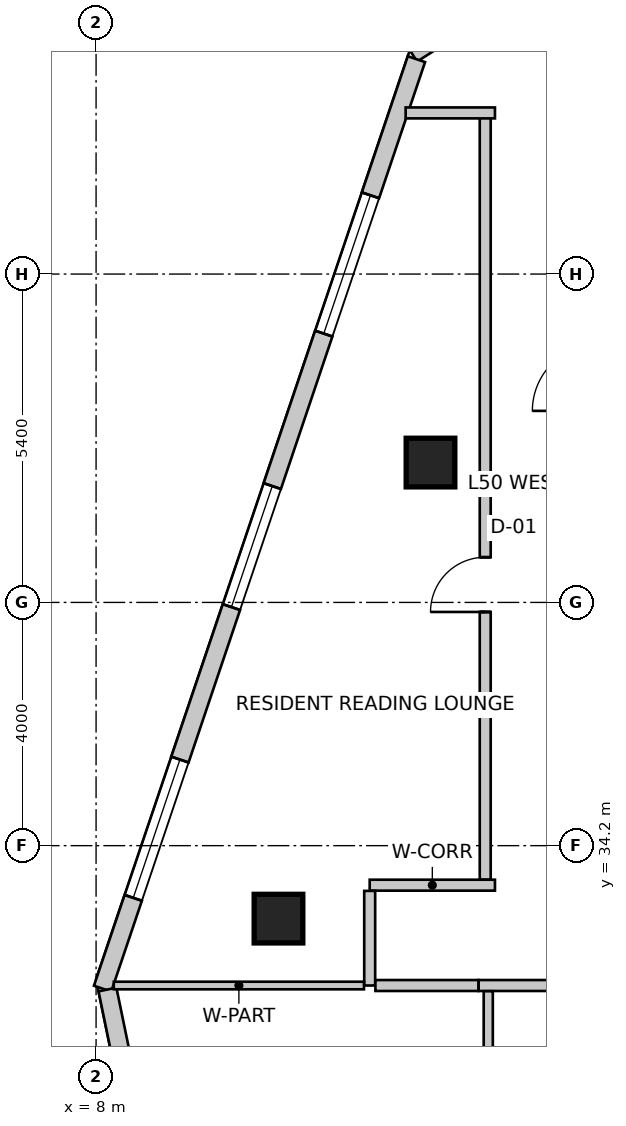
"""IFC4 building model, lengths in metres.
Left out: names, types, materials, properties, quantities, classifications, styles, units other than length and angle.
Written with IfcOpenShell. Run it as: python <this file> out.ifc"""

import sys

from ifc_helpers import new_model, si_unit, direction, frame, frame_2d, origin, origin_2d, place, context, subcontext, project, spatial, rectangle, extrude, source, transform, mapped, element, fill, save


model = new_model("IFC4")
c1 = context("Model", 3, precision=1e-05, world=origin(), true_north=direction((0.0, 1.0)))
c2 = subcontext(c1, "Body", "Model", "MODEL_VIEW")
j1 = project(units=[si_unit("LENGTHUNIT", "METRE"), si_unit("PLANEANGLEUNIT", "RADIAN")], contexts=[c1])
p1 = place(None, origin())
s1 = spatial("IfcSite", under=j1, at=p1, CompositionType="ELEMENT")
p2 = place(p1, origin())
s2 = spatial("IfcBuilding", under=s1, at=p2, CompositionType="ELEMENT")
p3 = place(p2, frame((0.0, 0.0, 200.9)))
s3 = spatial("IfcBuildingStorey", under=s2, at=p3, CompositionType="ELEMENT", Elevation=200.9)
m1 = source(origin(), c2, "Body", "SweptSolid", [
    extrude(rectangle(XDim=0.8, YDim=0.8, at=origin_2d()), origin(), (0.0, 0.0, 1.0), 3.5),
])
for number, where, z_axis, x_axis in (
    (1, (11.0, 33.0, 0.0), (0.0, 0.0, 1.0), (1.0, 0.0, 0.0)),
    (2, (13.5, 40.5, 0.0), (0.0, 0.0, 1.0), (1.0, 0.0, 0.0)),
):
    element("IfcColumn", number, at=place(p3, frame(where, z_axis=z_axis, x_axis=x_axis)), inside=s3, PredefinedType="COLUMN", context=c2, shape_type="MappedRepresentation", body=[
        mapped(m1, transform((0.0, 0.0, 0.0), scale=1.0)),
    ])
p4 = place(p3, frame((21.875, 52.742, 0.0), z_axis=(0.0, 0.0, 1.0), x_axis=(-0.843666375448, -0.536867811419, 0.0)))
e3 = element("IfcWall", 3, at=p4, inside=s3, PredefinedType="SOLIDWALL", context=c2, shape_type="SweptSolid", body=[
    extrude(rectangle(XDim=10.284, YDim=0.3, at=frame_2d((5.142, 0.0))), origin(), (0.0, 0.0, 1.0), 3.25),
])
m2 = source(origin(), c2, "Body", "SweptSolid", [
    extrude(rectangle(XDim=2.1, YDim=2.0, at=frame_2d((1.05, 1.0))), frame((0.0, 0.16, 0.0), z_axis=(0.0, -1.0, 0.0), x_axis=(1.0, 0.0, 0.0)), (0.0, 0.0, 1.0), 0.32),
])
p5 = place(p4, frame((3.457, 0.0, 0.85)))
e4 = element("IfcOpeningElement", 4, at=p5, cuts=e3, PredefinedType="OPENING", context=c2, shape_type="MappedRepresentation", body=[
    mapped(m2, transform((0.0, 0.0, 0.0), scale=1.0)),
])
p6 = place(p3, frame((13.269, 47.134, 0.0), z_axis=(0.0, 0.0, 1.0), x_axis=(-0.319920776449, -0.947444297464, 0.0)))
e5 = element("IfcWall", 5, at=p6, inside=s3, PredefinedType="SOLIDWALL", context=c2, shape_type="SweptSolid", body=[
    extrude(rectangle(XDim=16.133, YDim=0.3, at=frame_2d((8.067, 0.0))), origin(), (0.0, 0.0, 1.0), 3.25),
])
m3 = source(origin(), c2, "Body", "SweptSolid", [
    extrude(rectangle(XDim=2.4, YDim=2.2, at=frame_2d((1.2, 1.1))), frame((0.0, 0.16, 0.0), z_axis=(0.0, -1.0, 0.0), x_axis=(1.0, 0.0, 0.0)), (0.0, 0.0, 1.0), 0.32),
])
p7 = place(p6, frame((2.363, 0.0, 0.85)))
e6 = element("IfcOpeningElement", 6, at=p7, cuts=e5, PredefinedType="OPENING", context=c2, shape_type="MappedRepresentation", body=[
    mapped(m3, transform((0.0, 0.0, 0.0), scale=1.0)),
])
p8 = place(p6, frame((7.41, 0.0, 0.85)))
e7 = element("IfcOpeningElement", 7, at=p8, cuts=e5, PredefinedType="OPENING", context=c2, shape_type="MappedRepresentation", body=[
    mapped(m2, transform((0.0, 0.0, 0.0), scale=1.0)),
])
p9 = place(p6, frame((12.157, 0.0, 0.85)))
e8 = element("IfcOpeningElement", 8, at=p9, cuts=e5, PredefinedType="OPENING", context=c2, shape_type="MappedRepresentation", body=[
    mapped(m3, transform((0.0, 0.0, 0.0), scale=1.0)),
])
p10 = place(p3, frame((8.188, 31.834, 0.0), z_axis=(0.0, 0.0, 1.0), x_axis=(0.202303475707, -0.979322880217, 0.0)))
e9 = element("IfcWall", 9, at=p10, inside=s3, PredefinedType="SOLIDWALL", context=c2, shape_type="SweptSolid", body=[
    extrude(rectangle(XDim=15.766, YDim=0.3, at=frame_2d((7.883, 0.0))), origin(), (0.0, 0.0, 1.0), 3.25),
])
p11 = place(p10, frame((2.399, 0.0, 0.85)))
e10 = element("IfcOpeningElement", 10, at=p11, cuts=e9, PredefinedType="OPENING", context=c2, shape_type="MappedRepresentation", body=[
    mapped(m2, transform((0.0, 0.0, 0.0), scale=1.0)),
])
p12 = place(p10, frame((8.798, 0.0, 0.85)))
e11 = element("IfcOpeningElement", 11, at=p12, cuts=e9, PredefinedType="OPENING", context=c2, shape_type="MappedRepresentation", body=[
    mapped(m2, transform((0.0, 0.0, 0.0), scale=1.0)),
])
m4 = source(origin(), c2, "Body", "SweptSolid", [
    extrude(rectangle(XDim=1.2, YDim=1.6, at=frame_2d((0.6, 0.8))), frame((0.0, 0.16, 0.0), z_axis=(0.0, -1.0, 0.0), x_axis=(1.0, 0.0, 0.0)), (0.0, 0.0, 1.0), 0.32),
])
p13 = place(p10, frame((14.052, 0.0, 0.85)))
e12 = element("IfcOpeningElement", 12, at=p13, cuts=e9, PredefinedType="OPENING", context=c2, shape_type="MappedRepresentation", body=[
    mapped(m4, transform((0.0, 0.0, 0.0), scale=1.0)),
])
p14 = place(p3, frame((12.5, 33.55, 0.0), z_axis=(0.0, 0.0, 1.0), x_axis=(1.0, 0.0, 0.0)))
e13 = element("IfcWall", 13, at=p14, inside=s3, PredefinedType="PARTITIONING", context=c2, shape_type="SweptSolid", body=[
    extrude(rectangle(XDim=2.06, YDim=0.18, at=frame_2d((1.03, 0.0))), origin(), (0.0, 0.0, 1.0), 3.25),
])
p15 = place(p3, frame((12.5, 31.9, 0.0), z_axis=(0.0, 0.0, 1.0), x_axis=(0.0, 1.0, 0.0)))
e14 = element("IfcWall", 14, at=p15, inside=s3, PredefinedType="PARTITIONING", context=c2, shape_type="SweptSolid", body=[
    extrude(rectangle(XDim=1.556, YDim=0.18, at=frame_2d((0.778, 0.0))), origin(), (0.0, 0.0, 1.0), 2.934),
])
p16 = place(p3, frame((17.36, 31.9, 0.0), z_axis=(0.0, 0.0, 1.0), x_axis=(-1.0, 0.0, 0.0)))
e15 = element("IfcWall", 15, at=p16, inside=s3, PredefinedType="PARTITIONING", context=c2, shape_type="SweptSolid", body=[
    extrude(rectangle(XDim=3.07, YDim=0.18, at=frame_2d((1.535, 0.0))), origin(), (0.0, 0.0, 1.0), 2.934),
])
p17 = place(p3, frame((14.288, 31.9, 0.0), z_axis=(0.0, 0.0, 1.0), x_axis=(-1.0, 0.0, 0.0)))
e16 = element("IfcWall", 16, at=p17, inside=s3, PredefinedType="PARTITIONING", context=c2, shape_type="SweptSolid", body=[
    extrude(rectangle(XDim=1.694, YDim=0.18, at=frame_2d((0.847, 0.0))), origin(), (0.0, 0.0, 1.0), 2.934),
])
p18 = place(p3, frame((14.4, 33.644, 0.0), z_axis=(0.0, 0.0, 1.0), x_axis=(0.0, 1.0, 0.0)))
e17 = element("IfcWall", 17, at=p18, inside=s3, PredefinedType="PARTITIONING", context=c2, shape_type="SweptSolid", body=[
    extrude(rectangle(XDim=12.606, YDim=0.18, at=frame_2d((6.303, 0.0))), origin(), (0.0, 0.0, 1.0), 3.25),
])
m5 = source(origin(), c2, "Body", "SweptSolid", [
    extrude(rectangle(XDim=0.9, YDim=2.15, at=frame_2d((0.45, 1.075))), frame((0.0, 0.1, 0.0), z_axis=(0.0, -1.0, 0.0), x_axis=(1.0, 0.0, 0.0)), (0.0, 0.0, 1.0), 0.2),
])
p19 = place(p18, frame((4.399, 0.0, 0.0)))
e18 = element("IfcOpeningElement", 18, at=p19, cuts=e17, PredefinedType="OPENING", context=c2, shape_type="MappedRepresentation", body=[
    mapped(m5, transform((0.0, 0.0, 0.0), scale=1.0)),
])
p20 = place(p3, frame((14.56, 46.25, 0.0), z_axis=(0.0, 0.0, 1.0), x_axis=(-1.0, 0.0, 0.0)))
e19 = element("IfcWall", 19, at=p20, inside=s3, PredefinedType="PARTITIONING", context=c2, shape_type="SweptSolid", body=[
    extrude(rectangle(XDim=1.469, YDim=0.18, at=frame_2d((0.734, 0.0))), origin(), (0.0, 0.0, 1.0), 3.25),
])
p21 = place(p3, frame((12.406, 31.9, 0.0), z_axis=(0.0, 0.0, 1.0), x_axis=(-1.0, 0.0, 0.0)))
e20 = element("IfcWall", 20, at=p21, inside=s3, PredefinedType="PARTITIONING", context=c2, shape_type="SweptSolid", body=[
    extrude(rectangle(XDim=4.115, YDim=0.125, at=frame_2d((2.057, 0.0))), origin(), (0.0, 0.0, 1.0), 2.542),
])
p22 = place(p3, frame((14.45, 25.279, 0.0), z_axis=(0.0, 0.0, 1.0), x_axis=(0.0, 1.0, 0.0)))
e21 = element("IfcWall", 21, at=p22, inside=s3, PredefinedType="PARTITIONING", context=c2, shape_type="SweptSolid", body=[
    extrude(rectangle(XDim=6.527, YDim=0.15, at=frame_2d((3.263, 0.0))), origin(), (0.0, 0.0, 1.0), 2.766),
])
m6 = source(origin(), c2, "Body", "SweptSolid", [
    extrude(rectangle(XDim=2.4, YDim=2.2, at=frame_2d((1.2, 1.1))), frame((0.0, -0.015, 0.0), z_axis=(0.0, -1.0, 0.0), x_axis=(1.0, 0.0, 0.0)), (0.0, 0.0, 1.0), 0.06),
])
p23 = place(p7, origin())
e22 = element("IfcWindow", 22, at=p23, inside=s3, PartitioningType="SINGLE_PANEL", PredefinedType="WINDOW", context=c2, shape_type="MappedRepresentation", body=[
    mapped(m6, transform((0.0, 0.0, 0.0), scale=1.0)),
])
fill(e6, e22)
m7 = source(origin(), c2, "Body", "SweptSolid", [
    extrude(rectangle(XDim=2.1, YDim=2.0, at=frame_2d((1.05, 1.0))), frame((0.0, -0.015, 0.0), z_axis=(0.0, -1.0, 0.0), x_axis=(1.0, 0.0, 0.0)), (0.0, 0.0, 1.0), 0.06),
])
p24 = place(p8, origin())
e23 = element("IfcWindow", 23, at=p24, inside=s3, PartitioningType="SINGLE_PANEL", PredefinedType="WINDOW", context=c2, shape_type="MappedRepresentation", body=[
    mapped(m7, transform((0.0, 0.0, 0.0), scale=1.0)),
])
fill(e7, e23)
p25 = place(p9, origin())
e24 = element("IfcWindow", 24, at=p25, inside=s3, PartitioningType="SINGLE_PANEL", PredefinedType="WINDOW", context=c2, shape_type="MappedRepresentation", body=[
    mapped(m6, transform((0.0, 0.0, 0.0), scale=1.0)),
])
fill(e8, e24)
m8 = source(origin(), c2, "Body", "SweptSolid", [
    extrude(rectangle(XDim=0.9, YDim=2.15, at=frame_2d((0.45, 1.075))), frame((0.0, 0.025, 0.0), z_axis=(0.0, -1.0, 0.0), x_axis=(1.0, 0.0, 0.0)), (0.0, 0.0, 1.0), 0.05),
])
p26 = place(p19, origin())
e25 = element("IfcDoor", 25, at=p26, inside=s3, OperationType="SINGLE_SWING_LEFT", PredefinedType="DOOR", context=c2, shape_type="MappedRepresentation", body=[
    mapped(m8, transform((0.0, 0.0, 0.0), scale=1.0)),
])
fill(e18, e25)
save(model, sys.argv[1])
